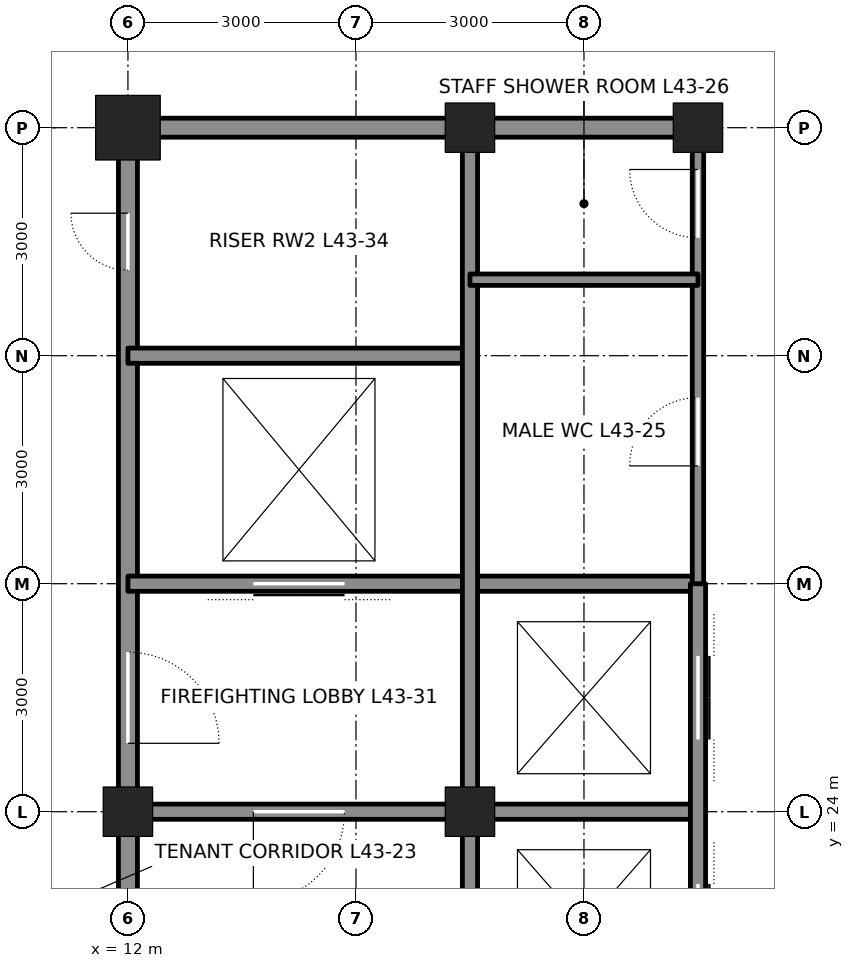
"""IFC4 building model, lengths in metres.
Left out: names, types, materials, properties, quantities, classifications, styles, units other than length and angle.
Written with IfcOpenShell. Run it as: python <this file> out.ifc"""

import sys

from ifc_helpers import new_model, si_unit, direction, frame, frame_2d, origin, origin_2d, place, context, subcontext, project, spatial, rectangle, hollow_rectangle, extrude, element, fill, save


model = new_model("IFC4")
c1 = context("Model", 3, precision=1e-05, world=origin(), true_north=direction((0.0, 1.0)))
c2 = subcontext(c1, "Body", "Model", "MODEL_VIEW")
j1 = project(units=[si_unit("LENGTHUNIT", "METRE"), si_unit("PLANEANGLEUNIT", "RADIAN")], contexts=[c1])
p1 = place(None, origin())
s1 = spatial("IfcSite", under=j1, at=p1, CompositionType="ELEMENT")
p2 = place(p1, origin())
s2 = spatial("IfcBuilding", under=s1, at=p2, CompositionType="ELEMENT")
p3 = place(p2, frame((0.0, 0.0, 197.1)))
s3 = spatial("IfcBuildingStorey", under=s2, at=p3, CompositionType="ELEMENT", Elevation=197.1)
p4 = place(p3, frame((12.0, 33.0, 0.0), z_axis=(0.0, 0.0, 1.0), x_axis=(1.0, 0.0, 0.0)))
e1 = element("IfcColumn", 1, at=p4, inside=s3, PredefinedType="COLUMN", context=c2, shape_type="SweptSolid", body=[
    extrude(hollow_rectangle(XDim=0.85, YDim=0.85, WallThickness=0.085, at=origin_2d()), origin(), (0.0, 0.0, 1.0), 4.2),
])
for number, where, z_axis, x_axis in (
    (2, (16.5, 33.0, 0.0), (0.0, 0.0, 1.0), (1.0, 0.0, 0.0)),
    (3, (19.5, 33.0, 0.0), (0.0, 0.0, 1.0), (1.0, 0.0, 0.0)),
    (4, (12.0, 24.0, 0.0), (0.0, 0.0, 1.0), (1.0, 0.0, 0.0)),
    (5, (16.5, 24.0, 0.0), (0.0, 0.0, 1.0), (1.0, 0.0, 0.0)),
):
    element("IfcColumn", number, at=place(p3, frame(where, z_axis=z_axis, x_axis=x_axis)), inside=s3, PredefinedType="COLUMN", context=c2, shape_type="SweptSolid", body=[
        extrude(hollow_rectangle(XDim=0.65, YDim=0.65, WallThickness=0.065, at=origin_2d()), origin(), (0.0, 0.0, 1.0), 4.2),
    ])
p5 = place(p3, frame((12.0, 21.25, 0.0), z_axis=(0.0, 0.0, 1.0), x_axis=(0.0, 1.0, 0.0)))
e6 = element("IfcWall", 6, at=p5, inside=s3, PredefinedType="SOLIDWALL", context=c2, shape_type="SweptSolid", body=[
    extrude(rectangle(XDim=2.5, YDim=0.25, at=frame_2d((1.25, 0.0))), origin(), (0.0, 0.0, 1.0), 3.113),
])
p6 = place(p3, frame((12.0, 24.25, 0.0), z_axis=(0.0, 0.0, 1.0), x_axis=(0.0, 1.0, 0.0)))
e7 = element("IfcWall", 7, at=p6, inside=s3, PredefinedType="SOLIDWALL", context=c2, shape_type="SweptSolid", body=[
    extrude(rectangle(XDim=8.5, YDim=0.25, at=frame_2d((4.25, 0.0))), origin(), (0.0, 0.0, 1.0), 3.113),
])
p7 = place(p6, frame((0.65, 0.0, 0.0)))
e8 = element("IfcOpeningElement", 8, at=p7, cuts=e7, PredefinedType="OPENING", context=c2, shape_type="SweptSolid", body=[
    extrude(rectangle(XDim=1.2, YDim=2.1, at=frame_2d((0.6, 1.05))), frame((0.0, 0.135, 0.0), z_axis=(0.0, -1.0, 0.0), x_axis=(1.0, 0.0, 0.0)), (0.0, 0.0, 1.0), 0.27),
])
p8 = place(p6, frame((6.875, 0.0, 0.0)))
e9 = element("IfcOpeningElement", 9, at=p8, cuts=e7, PredefinedType="OPENING", context=c2, shape_type="SweptSolid", body=[
    extrude(rectangle(XDim=0.75, YDim=2.1, at=frame_2d((0.375, 1.05))), frame((0.0, 0.135, 0.0), z_axis=(0.0, -1.0, 0.0), x_axis=(1.0, 0.0, 0.0)), (0.0, 0.0, 1.0), 0.27),
])
p9 = place(p3, frame((12.25, 24.0, 0.0), z_axis=(0.0, 0.0, 1.0), x_axis=(1.0, 0.0, 0.0)))
e10 = element("IfcWall", 10, at=p9, inside=s3, PredefinedType="SOLIDWALL", context=c2, shape_type="SweptSolid", body=[
    extrude(rectangle(XDim=4.0, YDim=0.2, at=frame_2d((2.0, 0.0))), origin(), (0.0, 0.0, 1.0), 3.09),
])
p10 = place(p9, frame((1.4, 0.0, 0.0)))
e11 = element("IfcOpeningElement", 11, at=p10, cuts=e10, PredefinedType="OPENING", context=c2, shape_type="SweptSolid", body=[
    extrude(rectangle(XDim=1.2, YDim=2.1, at=frame_2d((0.6, 1.05))), frame((0.0, 0.11, 0.0), z_axis=(0.0, -1.0, 0.0), x_axis=(1.0, 0.0, 0.0)), (0.0, 0.0, 1.0), 0.22),
])
p11 = place(p3, frame((16.75, 24.0, 0.0), z_axis=(0.0, 0.0, 1.0), x_axis=(1.0, 0.0, 0.0)))
e12 = element("IfcWall", 12, at=p11, inside=s3, PredefinedType="SOLIDWALL", context=c2, shape_type="SweptSolid", body=[
    extrude(rectangle(XDim=2.75, YDim=0.2, at=frame_2d((1.375, 0.0))), origin(), (0.0, 0.0, 1.0), 3.09),
])
p12 = place(p3, frame((12.0, 27.0, 0.0), z_axis=(0.0, 0.0, 1.0), x_axis=(1.0, 0.0, 0.0)))
e13 = element("IfcWall", 13, at=p12, inside=s3, PredefinedType="SOLIDWALL", context=c2, shape_type="SweptSolid", body=[
    extrude(rectangle(XDim=7.5, YDim=0.2, at=frame_2d((3.75, 0.0))), origin(), (0.0, 0.0, 1.0), 4.04),
])
p13 = place(p12, frame((1.65, 0.0, 0.0)))
e14 = element("IfcOpeningElement", 14, at=p13, cuts=e13, PredefinedType="OPENING", context=c2, shape_type="SweptSolid", body=[
    extrude(rectangle(XDim=1.2, YDim=2.1, at=frame_2d((0.6, 1.05))), frame((0.0, 0.11, 0.0), z_axis=(0.0, -1.0, 0.0), x_axis=(1.0, 0.0, 0.0)), (0.0, 0.0, 1.0), 0.22),
])
p14 = place(p3, frame((12.0, 30.0, 0.0), z_axis=(0.0, 0.0, 1.0), x_axis=(1.0, 0.0, 0.0)))
e15 = element("IfcWall", 15, at=p14, inside=s3, PredefinedType="SOLIDWALL", context=c2, shape_type="SweptSolid", body=[
    extrude(rectangle(XDim=4.5, YDim=0.2, at=frame_2d((2.25, 0.0))), origin(), (0.0, 0.0, 1.0), 4.04),
])
p15 = place(p3, frame((12.25, 33.0, 0.0), z_axis=(0.0, 0.0, 1.0), x_axis=(1.0, 0.0, 0.0)))
e16 = element("IfcWall", 16, at=p15, inside=s3, PredefinedType="SOLIDWALL", context=c2, shape_type="SweptSolid", body=[
    extrude(rectangle(XDim=4.0, YDim=0.25, at=frame_2d((2.0, 0.0))), origin(), (0.0, 0.0, 1.0), 3.181),
])
p16 = place(p3, frame((16.75, 33.0, 0.0), z_axis=(0.0, 0.0, 1.0), x_axis=(1.0, 0.0, 0.0)))
e17 = element("IfcWall", 17, at=p16, inside=s3, PredefinedType="SOLIDWALL", context=c2, shape_type="SweptSolid", body=[
    extrude(rectangle(XDim=2.5, YDim=0.25, at=frame_2d((1.25, 0.0))), origin(), (0.0, 0.0, 1.0), 3.181),
])
p17 = place(p3, frame((16.5, 21.25, 0.0), z_axis=(0.0, 0.0, 1.0), x_axis=(0.0, 1.0, 0.0)))
e18 = element("IfcWall", 18, at=p17, inside=s3, PredefinedType="SOLIDWALL", context=c2, shape_type="SweptSolid", body=[
    extrude(rectangle(XDim=2.5, YDim=0.2, at=frame_2d((1.25, 0.0))), origin(), (0.0, 0.0, 1.0), 3.113),
])
p18 = place(p3, frame((16.5, 24.25, 0.0), z_axis=(0.0, 0.0, 1.0), x_axis=(0.0, 1.0, 0.0)))
e19 = element("IfcWall", 19, at=p18, inside=s3, PredefinedType="SOLIDWALL", context=c2, shape_type="SweptSolid", body=[
    extrude(rectangle(XDim=8.5, YDim=0.2, at=frame_2d((4.25, 0.0))), origin(), (0.0, 0.0, 1.0), 3.113),
])
p19 = place(p3, frame((19.5, 15.0, 0.0), z_axis=(0.0, 0.0, 1.0), x_axis=(0.0, 1.0, 0.0)))
e20 = element("IfcWall", 20, at=p19, inside=s3, PredefinedType="SOLIDWALL", context=c2, shape_type="SweptSolid", body=[
    extrude(rectangle(XDim=12.0, YDim=0.2, at=frame_2d((6.0, 0.0))), origin(), (0.0, 0.0, 1.0), 3.064),
])
p20 = place(p19, frame((0.95, 0.0, 0.0)))
e21 = element("IfcOpeningElement", 21, at=p20, cuts=e20, PredefinedType="OPENING", context=c2, shape_type="SweptSolid", body=[
    extrude(rectangle(XDim=1.1, YDim=2.1, at=frame_2d((0.55, 1.05))), frame((0.0, 0.11, 0.0), z_axis=(0.0, -1.0, 0.0), x_axis=(1.0, 0.0, 0.0)), (0.0, 0.0, 1.0), 0.22),
])
p21 = place(p19, frame((3.95, 0.0, 0.0)))
e22 = element("IfcOpeningElement", 22, at=p21, cuts=e20, PredefinedType="OPENING", context=c2, shape_type="SweptSolid", body=[
    extrude(rectangle(XDim=1.1, YDim=2.1, at=frame_2d((0.55, 1.05))), frame((0.0, 0.11, 0.0), z_axis=(0.0, -1.0, 0.0), x_axis=(1.0, 0.0, 0.0)), (0.0, 0.0, 1.0), 0.22),
])
p22 = place(p19, frame((6.95, 0.0, 0.0)))
e23 = element("IfcOpeningElement", 23, at=p22, cuts=e20, PredefinedType="OPENING", context=c2, shape_type="SweptSolid", body=[
    extrude(rectangle(XDim=1.1, YDim=2.1, at=frame_2d((0.55, 1.05))), frame((0.0, 0.11, 0.0), z_axis=(0.0, -1.0, 0.0), x_axis=(1.0, 0.0, 0.0)), (0.0, 0.0, 1.0), 0.22),
])
p23 = place(p19, frame((9.95, 0.0, 0.0)))
e24 = element("IfcOpeningElement", 24, at=p23, cuts=e20, PredefinedType="OPENING", context=c2, shape_type="SweptSolid", body=[
    extrude(rectangle(XDim=1.1, YDim=2.1, at=frame_2d((0.55, 1.05))), frame((0.0, 0.11, 0.0), z_axis=(0.0, -1.0, 0.0), x_axis=(1.0, 0.0, 0.0)), (0.0, 0.0, 1.0), 0.22),
])
p24 = place(p3, frame((19.5, 27.0, 0.0), z_axis=(0.0, 0.0, 1.0), x_axis=(0.0, 1.0, 0.0)))
e25 = element("IfcWall", 25, at=p24, inside=s3, PredefinedType="PARTITIONING", context=c2, shape_type="SweptSolid", body=[
    extrude(rectangle(XDim=5.75, YDim=0.15, at=frame_2d((2.875, 0.0))), origin(), (0.0, 0.0, 1.0), 3.064),
])
p25 = place(p24, frame((1.55, 0.0, 0.0)))
e26 = element("IfcOpeningElement", 26, at=p25, cuts=e25, PredefinedType="OPENING", context=c2, shape_type="SweptSolid", body=[
    extrude(rectangle(XDim=0.9, YDim=2.1, at=frame_2d((0.45, 1.05))), frame((0.0, 0.085, 0.0), z_axis=(0.0, -1.0, 0.0), x_axis=(1.0, 0.0, 0.0)), (0.0, 0.0, 1.0), 0.17),
])
p26 = place(p24, frame((4.55, 0.0, 0.0)))
e27 = element("IfcOpeningElement", 27, at=p26, cuts=e25, PredefinedType="OPENING", context=c2, shape_type="SweptSolid", body=[
    extrude(rectangle(XDim=0.9, YDim=2.1, at=frame_2d((0.45, 1.05))), frame((0.0, 0.085, 0.0), z_axis=(0.0, -1.0, 0.0), x_axis=(1.0, 0.0, 0.0)), (0.0, 0.0, 1.0), 0.17),
])
p27 = place(p3, frame((16.5, 31.0, 0.0), z_axis=(0.0, 0.0, 1.0), x_axis=(1.0, 0.0, 0.0)))
e28 = element("IfcWall", 28, at=p27, inside=s3, PredefinedType="PARTITIONING", context=c2, shape_type="SweptSolid", body=[
    extrude(rectangle(XDim=3.0, YDim=0.15, at=frame_2d((1.5, 0.0))), origin(), (0.0, 0.0, 1.0), 4.04),
])
p28 = place(p10, frame((1.2, 0.0, 0.0), z_axis=(0.0, 0.0, 1.0), x_axis=(-1.0, 0.0, 0.0)))
e29 = element("IfcDoor", 29, at=p28, inside=s3, OperationType="SINGLE_SWING_RIGHT", PredefinedType="DOOR", context=c2, shape_type="SweptSolid", body=[
    extrude(rectangle(XDim=1.2, YDim=2.1, at=frame_2d((0.6, 1.05))), frame((0.0, 0.025, 0.0), z_axis=(0.0, -1.0, 0.0), x_axis=(1.0, 0.0, 0.0)), (0.0, 0.0, 1.0), 0.05),
])
fill(e11, e29)
p29 = place(p7, frame((1.2, 0.0, 0.0), z_axis=(0.0, 0.0, 1.0), x_axis=(-1.0, 0.0, 0.0)))
e30 = element("IfcDoor", 30, at=p29, inside=s3, OperationType="SINGLE_SWING_RIGHT", PredefinedType="DOOR", context=c2, shape_type="SweptSolid", body=[
    extrude(rectangle(XDim=1.2, YDim=2.1, at=frame_2d((0.6, 1.05))), frame((0.0, 0.025, 0.0), z_axis=(0.0, -1.0, 0.0), x_axis=(1.0, 0.0, 0.0)), (0.0, 0.0, 1.0), 0.05),
])
fill(e8, e30)
p30 = place(p13, origin())
e31 = element("IfcDoor", 31, at=p30, inside=s3, OperationType="DOUBLE_DOOR_SLIDING", PredefinedType="DOOR", context=c2, shape_type="SweptSolid", body=[
    extrude(rectangle(XDim=1.2, YDim=2.1, at=frame_2d((0.6, 1.05))), frame((0.0, 0.025, 0.0), z_axis=(0.0, -1.0, 0.0), x_axis=(1.0, 0.0, 0.0)), (0.0, 0.0, 1.0), 0.05),
])
fill(e14, e31)
p31 = place(p8, origin())
e32 = element("IfcDoor", 32, at=p31, inside=s3, OperationType="SINGLE_SWING_RIGHT", PredefinedType="DOOR", context=c2, shape_type="SweptSolid", body=[
    extrude(rectangle(XDim=0.75, YDim=2.1, at=frame_2d((0.375, 1.05))), frame((0.0, 0.025, 0.0), z_axis=(0.0, -1.0, 0.0), x_axis=(1.0, 0.0, 0.0)), (0.0, 0.0, 1.0), 0.05),
])
fill(e9, e32)
p32 = place(p25, origin())
e33 = element("IfcDoor", 33, at=p32, inside=s3, OperationType="SINGLE_SWING_LEFT", PredefinedType="DOOR", context=c2, shape_type="SweptSolid", body=[
    extrude(rectangle(XDim=0.9, YDim=2.1, at=frame_2d((0.45, 1.05))), frame((0.0, 0.025, 0.0), z_axis=(0.0, -1.0, 0.0), x_axis=(1.0, 0.0, 0.0)), (0.0, 0.0, 1.0), 0.05),
])
fill(e26, e33)
p33 = place(p26, origin())
e34 = element("IfcDoor", 34, at=p33, inside=s3, OperationType="SINGLE_SWING_RIGHT", PredefinedType="DOOR", context=c2, shape_type="SweptSolid", body=[
    extrude(rectangle(XDim=0.9, YDim=2.1, at=frame_2d((0.45, 1.05))), frame((0.0, 0.025, 0.0), z_axis=(0.0, -1.0, 0.0), x_axis=(1.0, 0.0, 0.0)), (0.0, 0.0, 1.0), 0.05),
])
fill(e27, e34)
p34 = place(p22, origin())
e35 = element("IfcDoor", 35, at=p34, inside=s3, OperationType="DOUBLE_DOOR_SLIDING", PredefinedType="DOOR", context=c2, shape_type="SweptSolid", body=[
    extrude(rectangle(XDim=1.1, YDim=2.1, at=frame_2d((0.55, 1.05))), frame((0.0, 0.025, 0.0), z_axis=(0.0, -1.0, 0.0), x_axis=(1.0, 0.0, 0.0)), (0.0, 0.0, 1.0), 0.05),
])
fill(e23, e35)
p35 = place(p23, origin())
e36 = element("IfcDoor", 36, at=p35, inside=s3, OperationType="DOUBLE_DOOR_SLIDING", PredefinedType="DOOR", context=c2, shape_type="SweptSolid", body=[
    extrude(rectangle(XDim=1.1, YDim=2.1, at=frame_2d((0.55, 1.05))), frame((0.0, 0.025, 0.0), z_axis=(0.0, -1.0, 0.0), x_axis=(1.0, 0.0, 0.0)), (0.0, 0.0, 1.0), 0.05),
])
fill(e24, e36)
save(model, sys.argv[1])
